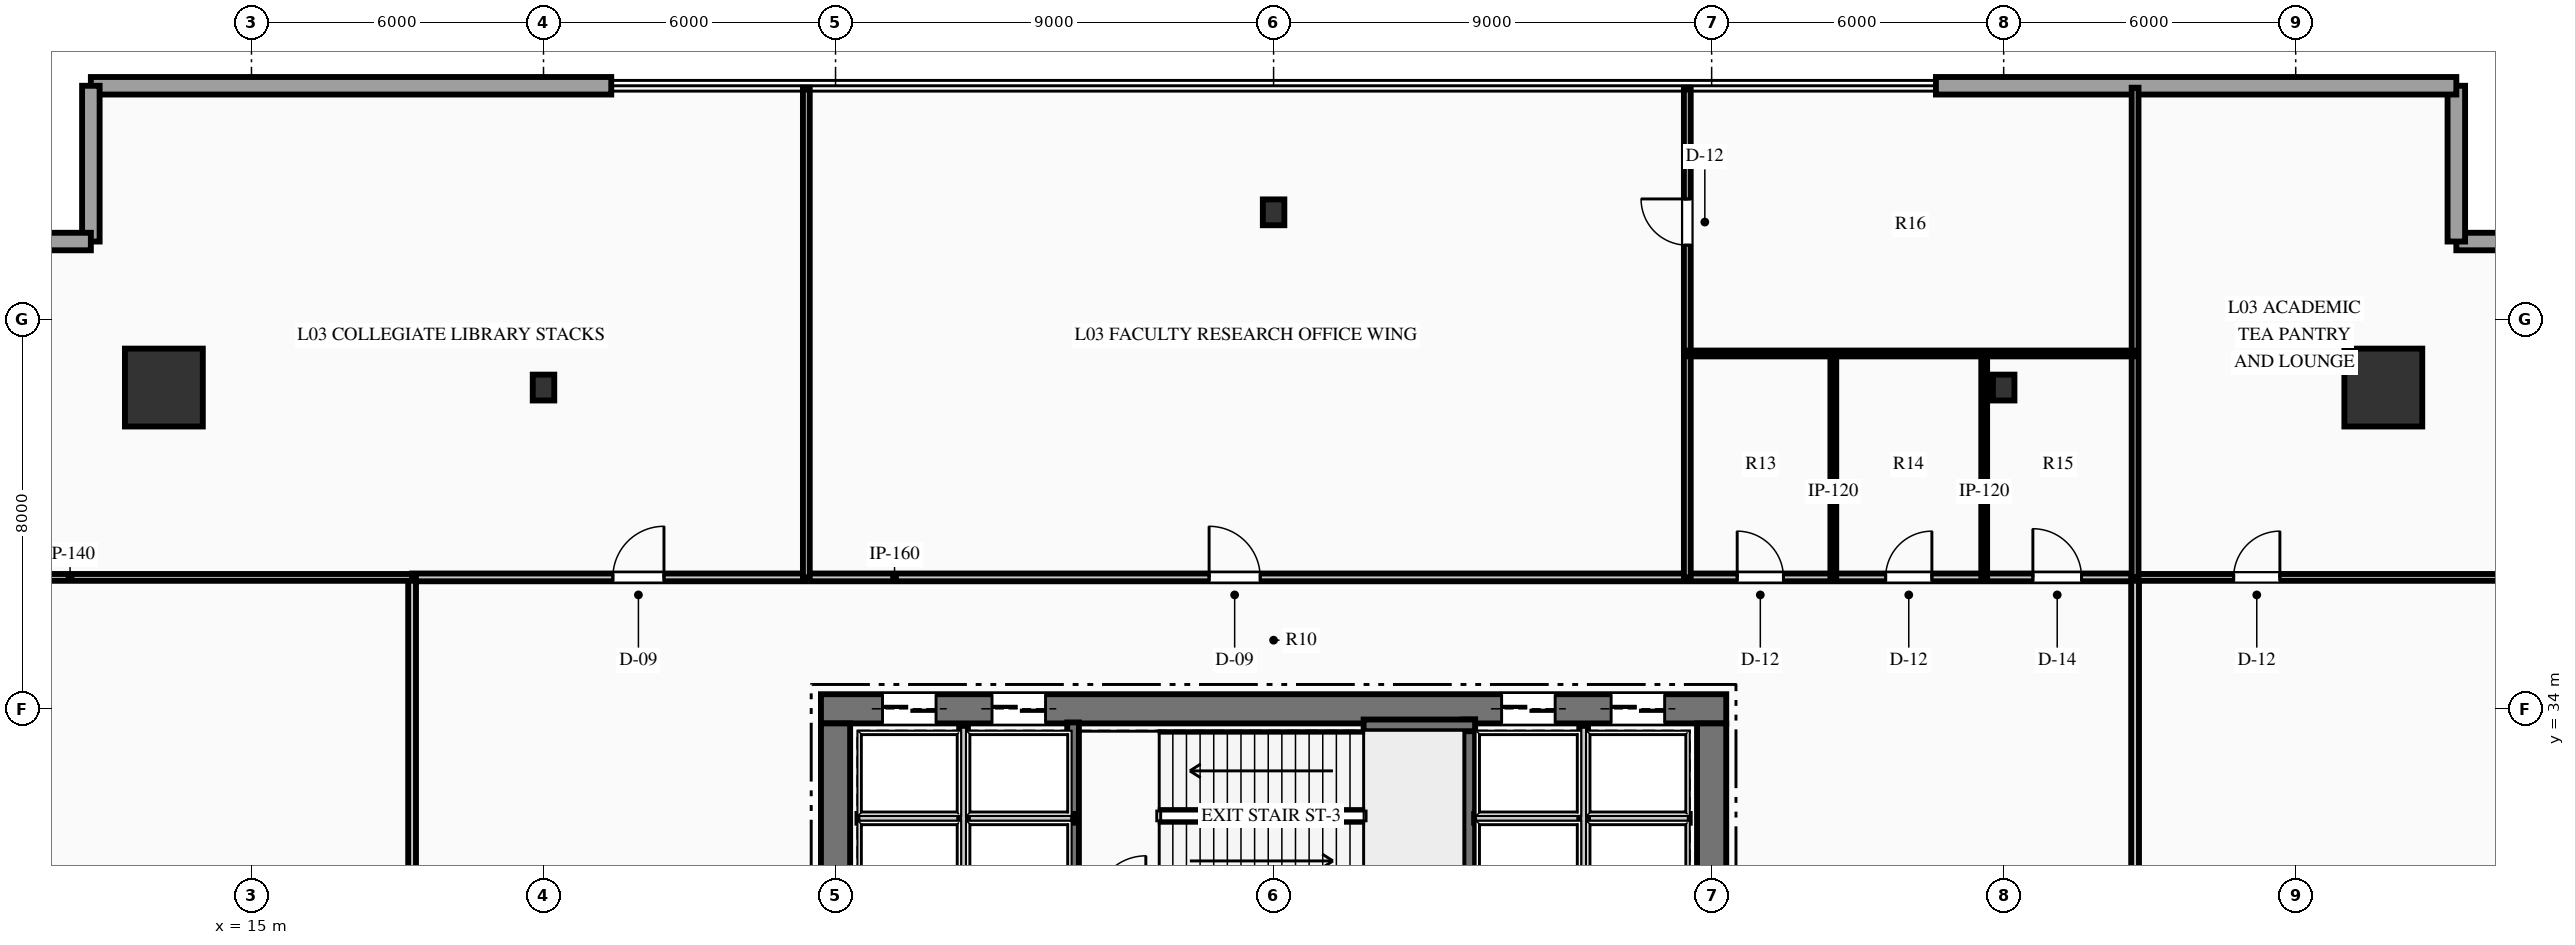
"""IFC4 building model, lengths in metres.
Left out: names, types, materials, properties, quantities, classifications, styles, units other than length and angle.
Written with IfcOpenShell. Run it as: python <this file> out.ifc"""

import sys

from ifc_helpers import new_model, si_unit, direction, frame, frame_2d, origin, origin_2d, place, context, subcontext, project, spatial, rectangle, hollow_rectangle, i_section, extrude, element, fill, save


model = new_model("IFC4")
c1 = context("Model", 3, precision=1e-05, world=origin(), true_north=direction((0.0, 1.0)))
c2 = subcontext(c1, "Body", "Model", "MODEL_VIEW")
j1 = project(units=[si_unit("LENGTHUNIT", "METRE"), si_unit("PLANEANGLEUNIT", "RADIAN")], contexts=[c1])
p1 = place(None, origin())
s1 = spatial("IfcSite", under=j1, at=p1, CompositionType="ELEMENT")
p2 = place(p1, origin())
s2 = spatial("IfcBuilding", under=s1, at=p2, CompositionType="ELEMENT")
p3 = place(p2, frame((0.0, 0.0, 16.8)))
s3 = spatial("IfcBuildingStorey", under=s2, at=p3, CompositionType="ELEMENT", Elevation=16.8)
p4 = place(p3, frame((26.7, 34.0, 0.0), z_axis=(0.0, 0.0, 1.0), x_axis=(1.0, 0.0, 0.0)))
e1 = element("IfcWall", 1, at=p4, inside=s3, PredefinedType="SHEAR", context=c2, shape_type="SweptSolid", body=[
    extrude(rectangle(XDim=18.6, YDim=0.6, at=frame_2d((9.3, 0.0))), origin(), (0.0, 0.0, 1.0), 5.4),
])
p5 = place(p4, frame((1.265, 0.0, 0.0)))
e2 = element("IfcOpeningElement", 2, at=p5, cuts=e1, PredefinedType="OPENING", context=c2, shape_type="SweptSolid", body=[
    extrude(rectangle(XDim=1.1, YDim=2.15, at=frame_2d((0.55, 1.075))), frame((0.0, 0.31, 0.0), z_axis=(0.0, -1.0, 0.0), x_axis=(1.0, 0.0, 0.0)), (0.0, 0.0, 1.0), 0.62),
])
p6 = place(p4, frame((3.515, 0.0, 0.0)))
e3 = element("IfcOpeningElement", 3, at=p6, cuts=e1, PredefinedType="OPENING", context=c2, shape_type="SweptSolid", body=[
    extrude(rectangle(XDim=1.1, YDim=2.15, at=frame_2d((0.55, 1.075))), frame((0.0, 0.31, 0.0), z_axis=(0.0, -1.0, 0.0), x_axis=(1.0, 0.0, 0.0)), (0.0, 0.0, 1.0), 0.62),
])
p7 = place(p4, frame((13.985, 0.0, 0.0)))
e4 = element("IfcOpeningElement", 4, at=p7, cuts=e1, PredefinedType="OPENING", context=c2, shape_type="SweptSolid", body=[
    extrude(rectangle(XDim=1.1, YDim=2.15, at=frame_2d((0.55, 1.075))), frame((0.0, 0.31, 0.0), z_axis=(0.0, -1.0, 0.0), x_axis=(1.0, 0.0, 0.0)), (0.0, 0.0, 1.0), 0.62),
])
p8 = place(p4, frame((16.235, 0.0, 0.0)))
e5 = element("IfcOpeningElement", 5, at=p8, cuts=e1, PredefinedType="OPENING", context=c2, shape_type="SweptSolid", body=[
    extrude(rectangle(XDim=1.1, YDim=2.15, at=frame_2d((0.55, 1.075))), frame((0.0, 0.31, 0.0), z_axis=(0.0, -1.0, 0.0), x_axis=(1.0, 0.0, 0.0)), (0.0, 0.0, 1.0), 0.62),
])
p9 = place(p3, frame((27.0, 18.3, 0.0), z_axis=(0.0, 0.0, 1.0), x_axis=(0.0, 1.0, 0.0)))
e6 = element("IfcWall", 6, at=p9, inside=s3, PredefinedType="SHEAR", context=c2, shape_type="SweptSolid", body=[
    extrude(rectangle(XDim=15.4, YDim=0.6, at=frame_2d((7.7, 0.0))), origin(), (0.0, 0.0, 1.0), 5.4),
])
p10 = place(p9, frame((9.94, 0.0, 0.0)))
e7 = element("IfcOpeningElement", 7, at=p10, cuts=e6, PredefinedType="OPENING", context=c2, shape_type="SweptSolid", body=[
    extrude(rectangle(XDim=1.4, YDim=2.2, at=frame_2d((0.7, 1.1))), frame((0.0, 0.31, 0.0), z_axis=(0.0, -1.0, 0.0), x_axis=(1.0, 0.0, 0.0)), (0.0, 0.0, 1.0), 0.62),
])
p11 = place(p3, frame((45.0, 18.3, 0.0), z_axis=(0.0, 0.0, 1.0), x_axis=(0.0, 1.0, 0.0)))
e8 = element("IfcWall", 8, at=p11, inside=s3, PredefinedType="SHEAR", context=c2, shape_type="SweptSolid", body=[
    extrude(rectangle(XDim=15.4, YDim=0.6, at=frame_2d((7.7, 0.0))), origin(), (0.0, 0.0, 1.0), 5.4),
])
p12 = place(p11, frame((9.94, 0.0, 0.0)))
e9 = element("IfcOpeningElement", 9, at=p12, cuts=e8, PredefinedType="OPENING", context=c2, shape_type="SweptSolid", body=[
    extrude(rectangle(XDim=1.4, YDim=2.2, at=frame_2d((0.7, 1.1))), frame((0.0, 0.31, 0.0), z_axis=(0.0, -1.0, 0.0), x_axis=(1.0, 0.0, 0.0)), (0.0, 0.0, 1.0), 0.62),
])
p13 = place(p3, frame((31.88, 29.93, 0.0), z_axis=(0.0, 0.0, 1.0), x_axis=(0.0, 1.0, 0.0)))
e10 = element("IfcWall", 10, at=p13, inside=s3, PredefinedType="SHEAR", context=c2, shape_type="SweptSolid", body=[
    extrude(rectangle(XDim=3.79, YDim=0.24, at=frame_2d((1.895, 0.0))), origin(), (0.0, 0.0, 1.0), 5.4),
])
p14 = place(p3, frame((40.02, 29.93, 0.0), z_axis=(0.0, 0.0, 1.0), x_axis=(0.0, 1.0, 0.0)))
e11 = element("IfcWall", 11, at=p14, inside=s3, PredefinedType="SHEAR", context=c2, shape_type="SweptSolid", body=[
    extrude(rectangle(XDim=3.85, YDim=0.24, at=frame_2d((1.925, 0.0))), origin(), (0.0, 0.0, 1.0), 5.4),
])
p15 = place(p3, frame((37.85, 33.66, 0.0), z_axis=(0.0, 0.0, 1.0), x_axis=(1.0, 0.0, 0.0)))
e12 = element("IfcWall", 12, at=p15, inside=s3, PredefinedType="SHEAR", context=c2, shape_type="SweptSolid", body=[
    extrude(rectangle(XDim=2.29, YDim=0.24, at=frame_2d((1.145, 0.0))), origin(), (0.0, 0.0, 1.0), 5.4),
])
for number, where, z_axis, x_axis in (
    (13, (58.8, 40.6, 0.0), (0.0, 0.0, 1.0), (1.0, 0.0, 0.0)),
    (14, (13.2, 40.6, 0.0), (0.0, 0.0, 1.0), (1.0, 0.0, 0.0)),
):
    element("IfcColumn", number, at=place(p3, frame(where, z_axis=z_axis, x_axis=x_axis)), inside=s3, PredefinedType="COLUMN", context=c2, shape_type="SweptSolid", body=[
        extrude(hollow_rectangle(XDim=1.6, YDim=1.6, WallThickness=0.08, at=origin_2d()), origin(), (0.0, 0.0, 1.0), 5.4),
    ])
for number, where, z_axis, x_axis in (
    (15, (21.0, 40.6, 0.0), (0.0, 0.0, 1.0), (1.0, 0.0, 0.0)),
    (16, (51.0, 40.6, 0.0), (0.0, 0.0, 1.0), (1.0, 0.0, 0.0)),
    (17, (36.0, 44.2, 0.0), (0.0, 0.0, 1.0), (1.0, 0.0, 0.0)),
):
    element("IfcColumn", number, at=place(p3, frame(where, z_axis=z_axis, x_axis=x_axis)), inside=s3, PredefinedType="COLUMN", context=c2, shape_type="SweptSolid", body=[
        extrude(i_section(OverallWidth=0.442, OverallDepth=0.531, WebThickness=0.066, FlangeThickness=0.106, at=origin_2d()), origin(), (0.0, 0.0, 1.0), 5.4),
    ])
for number, where, z_axis, x_axis in (
    (18, (60.3, 43.6, 0.0), (0.0, 0.0, 1.0), (1.0, 0.0, 0.0)),
    (19, (60.3, 46.8, 0.0), (0.0, 0.0, 1.0), (0.0, -1.0, 0.0)),
):
    element("IfcWall", number, at=place(p3, frame(where, z_axis=z_axis, x_axis=x_axis)), inside=s3, PredefinedType="STANDARD", context=c2, shape_type="SweptSolid", body=[
        extrude(rectangle(XDim=3.2, YDim=0.36, at=frame_2d((1.6, 0.0))), origin(), (0.0, 0.0, 1.0), 4.98),
    ])
for number, where, z_axis, x_axis in (
    (20, (11.7, 46.8, 0.0), (0.0, 0.0, 1.0), (1.0, 0.0, 0.0)),
    (21, (49.608, 46.8, 0.0), (0.0, 0.0, 1.0), (1.0, 0.0, 0.0)),
):
    element("IfcWall", number, at=place(p3, frame(where, z_axis=z_axis, x_axis=x_axis)), inside=s3, PredefinedType="STANDARD", context=c2, shape_type="SweptSolid", body=[
        extrude(rectangle(XDim=10.692, YDim=0.36, at=frame_2d((5.346, 0.0))), origin(), (0.0, 0.0, 1.0), 4.98),
    ])
for number, where, z_axis, x_axis in (
    (22, (11.7, 43.6, 0.0), (0.0, 0.0, 1.0), (0.0, 1.0, 0.0)),
    (23, (8.5, 43.6, 0.0), (0.0, 0.0, 1.0), (1.0, 0.0, 0.0)),
):
    element("IfcWall", number, at=place(p3, frame(where, z_axis=z_axis, x_axis=x_axis)), inside=s3, PredefinedType="STANDARD", context=c2, shape_type="SweptSolid", body=[
        extrude(rectangle(XDim=3.2, YDim=0.36, at=frame_2d((1.6, 0.0))), origin(), (0.0, 0.0, 1.0), 4.98),
    ])
p16 = place(p3, frame((27.45, 31.75, 0.0), z_axis=(0.0, 0.0, 1.0), x_axis=(1.0, 0.0, 0.0)))
e24 = element("IfcWall", 24, at=p16, inside=s3, PredefinedType="PARTITIONING", context=c2, shape_type="SweptSolid", body=[
    extrude(rectangle(XDim=4.43, YDim=0.18, at=frame_2d((2.215, 0.0))), origin(), (0.0, 0.0, 1.0), 4.98),
])
p17 = place(p3, frame((29.63, 29.9, 0.0), z_axis=(0.0, 0.0, 1.0), x_axis=(0.0, 1.0, 0.0)))
e25 = element("IfcWall", 25, at=p17, inside=s3, PredefinedType="PARTITIONING", context=c2, shape_type="SweptSolid", body=[
    extrude(rectangle(XDim=3.75, YDim=0.18, at=frame_2d((1.875, 0.0))), origin(), (0.0, 0.0, 1.0), 4.98),
])
p18 = place(p3, frame((40.12, 31.75, 0.0), z_axis=(0.0, 0.0, 1.0), x_axis=(1.0, 0.0, 0.0)))
e26 = element("IfcWall", 26, at=p18, inside=s3, PredefinedType="PARTITIONING", context=c2, shape_type="SweptSolid", body=[
    extrude(rectangle(XDim=4.43, YDim=0.18, at=frame_2d((2.215, 0.0))), origin(), (0.0, 0.0, 1.0), 4.98),
])
p19 = place(p3, frame((42.37, 29.9, 0.0), z_axis=(0.0, 0.0, 1.0), x_axis=(0.0, 1.0, 0.0)))
e27 = element("IfcWall", 27, at=p19, inside=s3, PredefinedType="PARTITIONING", context=c2, shape_type="SweptSolid", body=[
    extrude(rectangle(XDim=3.75, YDim=0.18, at=frame_2d((1.875, 0.0))), origin(), (0.0, 0.0, 1.0), 4.98),
])
p20 = place(p3, frame((18.3, 36.7, 0.0), z_axis=(0.0, 0.0, 1.0), x_axis=(1.0, 0.0, 0.0)))
e28 = element("IfcWall", 28, at=p20, inside=s3, PredefinedType="PARTITIONING", context=c2, shape_type="SweptSolid", body=[
    extrude(rectangle(XDim=35.4, YDim=0.16, at=frame_2d((17.7, 0.0))), origin(), (0.0, 0.0, 1.0), 4.98),
])
p21 = place(p20, frame((4.125, 0.0, 0.0)))
e29 = element("IfcOpeningElement", 29, at=p21, cuts=e28, PredefinedType="OPENING", context=c2, shape_type="SweptSolid", body=[
    extrude(rectangle(XDim=1.05, YDim=2.15, at=frame_2d((0.525, 1.075))), frame((0.0, 0.09, 0.0), z_axis=(0.0, -1.0, 0.0), x_axis=(1.0, 0.0, 0.0)), (0.0, 0.0, 1.0), 0.18),
])
p22 = place(p20, frame((16.375, 0.0, 0.0)))
e30 = element("IfcOpeningElement", 30, at=p22, cuts=e28, PredefinedType="OPENING", context=c2, shape_type="SweptSolid", body=[
    extrude(rectangle(XDim=1.05, YDim=2.15, at=frame_2d((0.525, 1.075))), frame((0.0, 0.09, 0.0), z_axis=(0.0, -1.0, 0.0), x_axis=(1.0, 0.0, 0.0)), (0.0, 0.0, 1.0), 0.18),
])
p23 = place(p20, frame((27.225, 0.0, 0.0)))
e31 = element("IfcOpeningElement", 31, at=p23, cuts=e28, PredefinedType="OPENING", context=c2, shape_type="SweptSolid", body=[
    extrude(rectangle(XDim=0.95, YDim=2.15, at=frame_2d((0.475, 1.075))), frame((0.0, 0.09, 0.0), z_axis=(0.0, -1.0, 0.0), x_axis=(1.0, 0.0, 0.0)), (0.0, 0.0, 1.0), 0.18),
])
p24 = place(p20, frame((30.275, 0.0, 0.0)))
e32 = element("IfcOpeningElement", 32, at=p24, cuts=e28, PredefinedType="OPENING", context=c2, shape_type="SweptSolid", body=[
    extrude(rectangle(XDim=0.95, YDim=2.15, at=frame_2d((0.475, 1.075))), frame((0.0, 0.09, 0.0), z_axis=(0.0, -1.0, 0.0), x_axis=(1.0, 0.0, 0.0)), (0.0, 0.0, 1.0), 0.18),
])
p25 = place(p20, frame((33.3, 0.0, 0.0)))
e33 = element("IfcOpeningElement", 33, at=p25, cuts=e28, PredefinedType="OPENING", context=c2, shape_type="SweptSolid", body=[
    extrude(rectangle(XDim=1.0, YDim=2.15, at=frame_2d((0.5, 1.075))), frame((0.0, 0.09, 0.0), z_axis=(0.0, -1.0, 0.0), x_axis=(1.0, 0.0, 0.0)), (0.0, 0.0, 1.0), 0.18),
])
for number, where, z_axis, x_axis in (
    (34, (18.3, 30.15, 0.0), (0.0, 0.0, 1.0), (0.0, 1.0, 0.0)),
    (35, (53.7, 30.15, 0.0), (0.0, 0.0, 1.0), (0.0, 1.0, 0.0)),
):
    element("IfcWall", number, at=place(p3, frame(where, z_axis=z_axis, x_axis=x_axis)), inside=s3, PredefinedType="PARTITIONING", context=c2, shape_type="SweptSolid", body=[
        extrude(rectangle(XDim=6.55, YDim=0.16, at=frame_2d((3.275, 0.0))), origin(), (0.0, 0.0, 1.0), 4.98),
    ])
p26 = place(p3, frame((8.54, 36.7, 0.0), z_axis=(0.0, 0.0, 1.0), x_axis=(1.0, 0.0, 0.0)))
e36 = element("IfcWall", 36, at=p26, inside=s3, PredefinedType="PARTITIONING", context=c2, shape_type="SweptSolid", body=[
    extrude(rectangle(XDim=9.76, YDim=0.14, at=frame_2d((4.88, 0.0))), origin(), (0.0, 0.0, 1.0), 4.98),
])
p27 = place(p3, frame((53.7, 36.7, 0.0), z_axis=(0.0, 0.0, 1.0), x_axis=(1.0, 0.0, 0.0)))
e37 = element("IfcWall", 37, at=p27, inside=s3, PredefinedType="PARTITIONING", context=c2, shape_type="SweptSolid", body=[
    extrude(rectangle(XDim=9.76, YDim=0.14, at=frame_2d((4.88, 0.0))), origin(), (0.0, 0.0, 1.0), 4.98),
])
p28 = place(p27, frame((2.025, 0.0, 0.0)))
e38 = element("IfcOpeningElement", 38, at=p28, cuts=e37, PredefinedType="OPENING", context=c2, shape_type="SweptSolid", body=[
    extrude(rectangle(XDim=0.95, YDim=2.15, at=frame_2d((0.475, 1.075))), frame((0.0, 0.08, 0.0), z_axis=(0.0, -1.0, 0.0), x_axis=(1.0, 0.0, 0.0)), (0.0, 0.0, 1.0), 0.16),
])
p29 = place(p3, frame((26.4, 36.7, 0.0), z_axis=(0.0, 0.0, 1.0), x_axis=(0.0, 1.0, 0.0)))
e39 = element("IfcWall", 39, at=p29, inside=s3, PredefinedType="PARTITIONING", context=c2, shape_type="SweptSolid", body=[
    extrude(rectangle(XDim=10.06, YDim=0.14, at=frame_2d((5.03, 0.0))), origin(), (0.0, 0.0, 1.0), 4.98),
])
p30 = place(p3, frame((44.5, 36.7, 0.0), z_axis=(0.0, 0.0, 1.0), x_axis=(0.0, 1.0, 0.0)))
e40 = element("IfcWall", 40, at=p30, inside=s3, PredefinedType="PARTITIONING", context=c2, shape_type="SweptSolid", body=[
    extrude(rectangle(XDim=10.06, YDim=0.14, at=frame_2d((5.03, 0.0))), origin(), (0.0, 0.0, 1.0), 4.98),
])
p31 = place(p30, frame((6.825, 0.0, 0.0)))
e41 = element("IfcOpeningElement", 41, at=p31, cuts=e40, PredefinedType="OPENING", context=c2, shape_type="SweptSolid", body=[
    extrude(rectangle(XDim=0.95, YDim=2.15, at=frame_2d((0.475, 1.075))), frame((0.0, 0.08, 0.0), z_axis=(0.0, -1.0, 0.0), x_axis=(1.0, 0.0, 0.0)), (0.0, 0.0, 1.0), 0.16),
])
p32 = place(p3, frame((53.7, 36.7, 0.0), z_axis=(0.0, 0.0, 1.0), x_axis=(0.0, 1.0, 0.0)))
e42 = element("IfcWall", 42, at=p32, inside=s3, PredefinedType="PARTITIONING", context=c2, shape_type="SweptSolid", body=[
    extrude(rectangle(XDim=10.06, YDim=0.14, at=frame_2d((5.03, 0.0))), origin(), (0.0, 0.0, 1.0), 4.98),
])
for number, where, z_axis, x_axis in (
    (43, (47.5, 36.7, 0.0), (0.0, 0.0, 1.0), (0.0, 1.0, 0.0)),
    (44, (50.6, 36.7, 0.0), (0.0, 0.0, 1.0), (0.0, 1.0, 0.0)),
):
    element("IfcWall", number, at=place(p3, frame(where, z_axis=z_axis, x_axis=x_axis)), inside=s3, PredefinedType="PARTITIONING", context=c2, shape_type="SweptSolid", body=[
        extrude(rectangle(XDim=4.6, YDim=0.12, at=frame_2d((2.3, 0.0))), origin(), (0.0, 0.0, 1.0), 4.98),
    ])
p33 = place(p3, frame((44.5, 41.3, 0.0), z_axis=(0.0, 0.0, 1.0), x_axis=(1.0, 0.0, 0.0)))
e45 = element("IfcWall", 45, at=p33, inside=s3, PredefinedType="PARTITIONING", context=c2, shape_type="SweptSolid", body=[
    extrude(rectangle(XDim=9.2, YDim=0.12, at=frame_2d((4.6, 0.0))), origin(), (0.0, 0.0, 1.0), 4.202),
])
p34 = place(p21, origin())
e46 = element("IfcDoor", 46, at=p34, inside=s3, OperationType="SINGLE_SWING_RIGHT", PredefinedType="DOOR", context=c2, shape_type="SweptSolid", body=[
    extrude(rectangle(XDim=1.05, YDim=2.15, at=frame_2d((0.525, 1.075))), frame((0.0, 0.025, 0.0), z_axis=(0.0, -1.0, 0.0), x_axis=(1.0, 0.0, 0.0)), (0.0, 0.0, 1.0), 0.05),
])
fill(e29, e46)
p35 = place(p22, origin())
e47 = element("IfcDoor", 47, at=p35, inside=s3, OperationType="SINGLE_SWING_LEFT", PredefinedType="DOOR", context=c2, shape_type="SweptSolid", body=[
    extrude(rectangle(XDim=1.05, YDim=2.15, at=frame_2d((0.525, 1.075))), frame((0.0, 0.025, 0.0), z_axis=(0.0, -1.0, 0.0), x_axis=(1.0, 0.0, 0.0)), (0.0, 0.0, 1.0), 0.05),
])
fill(e30, e47)
p36 = place(p31, origin())
e48 = element("IfcDoor", 48, at=p36, inside=s3, OperationType="SINGLE_SWING_RIGHT", PredefinedType="DOOR", context=c2, shape_type="SweptSolid", body=[
    extrude(rectangle(XDim=0.95, YDim=2.15, at=frame_2d((0.475, 1.075))), frame((0.0, 0.025, 0.0), z_axis=(0.0, -1.0, 0.0), x_axis=(1.0, 0.0, 0.0)), (0.0, 0.0, 1.0), 0.05),
])
fill(e41, e48)
p37 = place(p23, origin())
e49 = element("IfcDoor", 49, at=p37, inside=s3, OperationType="SINGLE_SWING_LEFT", PredefinedType="DOOR", context=c2, shape_type="SweptSolid", body=[
    extrude(rectangle(XDim=0.95, YDim=2.15, at=frame_2d((0.475, 1.075))), frame((0.0, 0.025, 0.0), z_axis=(0.0, -1.0, 0.0), x_axis=(1.0, 0.0, 0.0)), (0.0, 0.0, 1.0), 0.05),
])
fill(e31, e49)
p38 = place(p24, origin())
e50 = element("IfcDoor", 50, at=p38, inside=s3, OperationType="SINGLE_SWING_RIGHT", PredefinedType="DOOR", context=c2, shape_type="SweptSolid", body=[
    extrude(rectangle(XDim=0.95, YDim=2.15, at=frame_2d((0.475, 1.075))), frame((0.0, 0.025, 0.0), z_axis=(0.0, -1.0, 0.0), x_axis=(1.0, 0.0, 0.0)), (0.0, 0.0, 1.0), 0.05),
])
fill(e32, e50)
p39 = place(p25, origin())
e51 = element("IfcDoor", 51, at=p39, inside=s3, OperationType="SINGLE_SWING_LEFT", PredefinedType="DOOR", context=c2, shape_type="SweptSolid", body=[
    extrude(rectangle(XDim=1.0, YDim=2.15, at=frame_2d((0.5, 1.075))), frame((0.0, 0.025, 0.0), z_axis=(0.0, -1.0, 0.0), x_axis=(1.0, 0.0, 0.0)), (0.0, 0.0, 1.0), 0.05),
])
fill(e33, e51)
p40 = place(p28, origin())
e52 = element("IfcDoor", 52, at=p40, inside=s3, OperationType="SINGLE_SWING_RIGHT", PredefinedType="DOOR", context=c2, shape_type="SweptSolid", body=[
    extrude(rectangle(XDim=0.95, YDim=2.15, at=frame_2d((0.475, 1.075))), frame((0.0, 0.025, 0.0), z_axis=(0.0, -1.0, 0.0), x_axis=(1.0, 0.0, 0.0)), (0.0, 0.0, 1.0), 0.05),
])
fill(e38, e52)
p41 = place(p5, origin())
e53 = element("IfcDoor", 53, at=p41, inside=s3, OperationType="SLIDING_TO_LEFT", PredefinedType="DOOR", context=c2, shape_type="SweptSolid", body=[
    extrude(rectangle(XDim=1.1, YDim=2.15, at=frame_2d((0.55, 1.075))), frame((0.0, 0.025, 0.0), z_axis=(0.0, -1.0, 0.0), x_axis=(1.0, 0.0, 0.0)), (0.0, 0.0, 1.0), 0.05),
])
fill(e2, e53)
p42 = place(p6, origin())
e54 = element("IfcDoor", 54, at=p42, inside=s3, OperationType="SLIDING_TO_LEFT", PredefinedType="DOOR", context=c2, shape_type="SweptSolid", body=[
    extrude(rectangle(XDim=1.1, YDim=2.15, at=frame_2d((0.55, 1.075))), frame((0.0, 0.025, 0.0), z_axis=(0.0, -1.0, 0.0), x_axis=(1.0, 0.0, 0.0)), (0.0, 0.0, 1.0), 0.05),
])
fill(e3, e54)
p43 = place(p7, origin())
e55 = element("IfcDoor", 55, at=p43, inside=s3, OperationType="SLIDING_TO_LEFT", PredefinedType="DOOR", context=c2, shape_type="SweptSolid", body=[
    extrude(rectangle(XDim=1.1, YDim=2.15, at=frame_2d((0.55, 1.075))), frame((0.0, 0.025, 0.0), z_axis=(0.0, -1.0, 0.0), x_axis=(1.0, 0.0, 0.0)), (0.0, 0.0, 1.0), 0.05),
])
fill(e4, e55)
p44 = place(p8, origin())
e56 = element("IfcDoor", 56, at=p44, inside=s3, OperationType="SLIDING_TO_LEFT", PredefinedType="DOOR", context=c2, shape_type="SweptSolid", body=[
    extrude(rectangle(XDim=1.1, YDim=2.15, at=frame_2d((0.55, 1.075))), frame((0.0, 0.025, 0.0), z_axis=(0.0, -1.0, 0.0), x_axis=(1.0, 0.0, 0.0)), (0.0, 0.0, 1.0), 0.05),
])
fill(e5, e56)
save(model, sys.argv[1])
